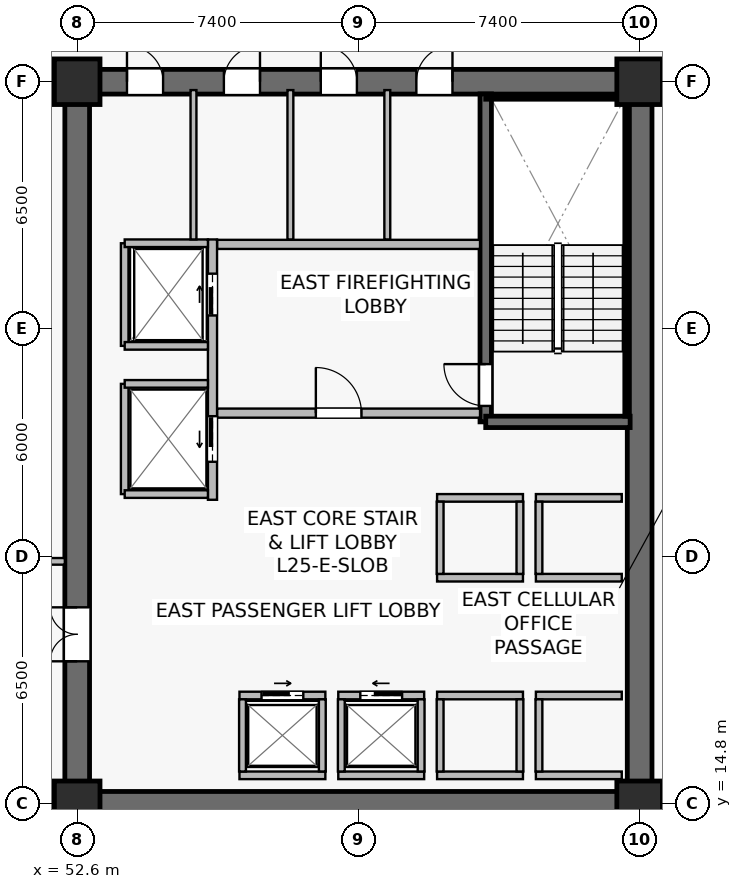
"""IFC4 building model, lengths in metres.
Left out: names, types, materials, properties, quantities, classifications, styles, units other than length and angle.
Written with IfcOpenShell. Run it as: python <this file> out.ifc"""

import sys

from ifc_helpers import new_model, si_unit, direction, frame, frame_2d, origin, origin_2d, place, context, subcontext, project, spatial, rectangle, extrude, source, transform, mapped, element, fill, save


model = new_model("IFC4")
c1 = context("Model", 3, precision=1e-05, world=origin(), true_north=direction((0.0, 1.0)))
c2 = subcontext(c1, "Body", "Model", "MODEL_VIEW")
j1 = project(units=[si_unit("LENGTHUNIT", "METRE"), si_unit("PLANEANGLEUNIT", "RADIAN")], contexts=[c1])
p1 = place(None, origin())
s1 = spatial("IfcSite", under=j1, at=p1, CompositionType="ELEMENT")
p2 = place(p1, origin())
s2 = spatial("IfcBuilding", under=s1, at=p2, CompositionType="ELEMENT")
p3 = place(p2, frame((0.0, 0.0, 105.1)))
s3 = spatial("IfcBuildingStorey", under=s2, at=p3, CompositionType="ELEMENT", Elevation=105.1)
p4 = place(p3, frame((52.275, 14.8, 0.0), z_axis=(0.0, 0.0, 1.0), x_axis=(1.0, 0.0, 0.0)))
e1 = element("IfcWall", 1, at=p4, inside=s3, PredefinedType="SHEAR", context=c2, shape_type="SweptSolid", body=[
    extrude(rectangle(XDim=15.45, YDim=0.65, at=frame_2d((7.725, 0.0))), origin(), (0.0, 0.0, 1.0), 3.79),
])
p5 = place(p3, frame((52.275, 33.8, 0.0), z_axis=(0.0, 0.0, 1.0), x_axis=(1.0, 0.0, 0.0)))
e2 = element("IfcWall", 2, at=p5, inside=s3, PredefinedType="SHEAR", context=c2, shape_type="SweptSolid", body=[
    extrude(rectangle(XDim=15.45, YDim=0.65, at=frame_2d((7.725, 0.0))), origin(), (0.0, 0.0, 1.0), 3.79),
])
p6 = place(p5, frame((9.25, 0.0, 0.0)))
e3 = element("IfcOpeningElement", 3, at=p6, cuts=e2, PredefinedType="OPENING", context=c2, shape_type="SweptSolid", body=[
    extrude(rectangle(XDim=0.95, YDim=2.15, at=frame_2d((0.475, 1.075))), frame((0.0, 0.335, 0.0), z_axis=(0.0, -1.0, 0.0), x_axis=(1.0, 0.0, 0.0)), (0.0, 0.0, 1.0), 0.67),
])
p7 = place(p5, frame((6.735, 0.0, 0.0)))
e4 = element("IfcOpeningElement", 4, at=p7, cuts=e2, PredefinedType="OPENING", context=c2, shape_type="SweptSolid", body=[
    extrude(rectangle(XDim=0.95, YDim=2.15, at=frame_2d((0.475, 1.075))), frame((0.0, 0.335, 0.0), z_axis=(0.0, -1.0, 0.0), x_axis=(1.0, 0.0, 0.0)), (0.0, 0.0, 1.0), 0.67),
])
p8 = place(p5, frame((4.185, 0.0, 0.0)))
e5 = element("IfcOpeningElement", 5, at=p8, cuts=e2, PredefinedType="OPENING", context=c2, shape_type="SweptSolid", body=[
    extrude(rectangle(XDim=0.95, YDim=2.15, at=frame_2d((0.475, 1.075))), frame((0.0, 0.335, 0.0), z_axis=(0.0, -1.0, 0.0), x_axis=(1.0, 0.0, 0.0)), (0.0, 0.0, 1.0), 0.67),
])
p9 = place(p5, frame((1.635, 0.0, 0.0)))
e6 = element("IfcOpeningElement", 6, at=p9, cuts=e2, PredefinedType="OPENING", context=c2, shape_type="SweptSolid", body=[
    extrude(rectangle(XDim=0.95, YDim=2.15, at=frame_2d((0.475, 1.075))), frame((0.0, 0.335, 0.0), z_axis=(0.0, -1.0, 0.0), x_axis=(1.0, 0.0, 0.0)), (0.0, 0.0, 1.0), 0.67),
])
p10 = place(p3, frame((52.6, 15.125, 0.0), z_axis=(0.0, 0.0, 1.0), x_axis=(0.0, 1.0, 0.0)))
e7 = element("IfcWall", 7, at=p10, inside=s3, PredefinedType="SHEAR", context=c2, shape_type="SweptSolid", body=[
    extrude(rectangle(XDim=18.35, YDim=0.65, at=frame_2d((9.175, 0.0))), origin(), (0.0, 0.0, 1.0), 3.79),
])
p11 = place(p10, frame((3.425, 0.0, 0.0)))
e8 = element("IfcOpeningElement", 8, at=p11, cuts=e7, PredefinedType="OPENING", context=c2, shape_type="SweptSolid", body=[
    extrude(rectangle(XDim=1.42, YDim=2.2, at=frame_2d((0.71, 1.1))), frame((0.0, 0.335, 0.0), z_axis=(0.0, -1.0, 0.0), x_axis=(1.0, 0.0, 0.0)), (0.0, 0.0, 1.0), 0.67),
])
p12 = place(p3, frame((67.4, 15.125, 0.0), z_axis=(0.0, 0.0, 1.0), x_axis=(0.0, 1.0, 0.0)))
e9 = element("IfcWall", 9, at=p12, inside=s3, PredefinedType="SHEAR", context=c2, shape_type="SweptSolid", body=[
    extrude(rectangle(XDim=18.35, YDim=0.65, at=frame_2d((9.175, 0.0))), origin(), (0.0, 0.0, 1.0), 3.79),
])
p13 = place(p3, frame((63.35, 24.85, 0.0), z_axis=(0.0, 0.0, 1.0), x_axis=(0.0, 1.0, 0.0)))
e10 = element("IfcWall", 10, at=p13, inside=s3, PredefinedType="SHEAR", context=c2, shape_type="SweptSolid", body=[
    extrude(rectangle(XDim=8.63, YDim=0.3, at=frame_2d((4.315, 0.0))), origin(), (0.0, 0.0, 1.0), 3.79),
])
p14 = place(p13, frame((0.42, 0.0, 0.0)))
e11 = element("IfcOpeningElement", 11, at=p14, cuts=e10, PredefinedType="OPENING", context=c2, shape_type="SweptSolid", body=[
    extrude(rectangle(XDim=1.1, YDim=2.15, at=frame_2d((0.55, 1.075))), frame((0.0, 0.16, 0.0), z_axis=(0.0, -1.0, 0.0), x_axis=(1.0, 0.0, 0.0)), (0.0, 0.0, 1.0), 0.32),
])
p15 = place(p3, frame((63.35, 24.85, 0.0), z_axis=(0.0, 0.0, 1.0), x_axis=(1.0, 0.0, 0.0)))
e12 = element("IfcWall", 12, at=p15, inside=s3, PredefinedType="SHEAR", context=c2, shape_type="SweptSolid", body=[
    extrude(rectangle(XDim=3.8, YDim=0.3, at=frame_2d((1.9, 0.0))), origin(), (0.0, 0.0, 1.0), 3.79),
])
p16 = place(p3, frame((63.35, 33.4, 0.0), z_axis=(0.0, 0.0, 1.0), x_axis=(1.0, 0.0, 0.0)))
e13 = element("IfcWall", 13, at=p16, inside=s3, PredefinedType="SOLIDWALL", context=c2, shape_type="SweptSolid", body=[
    extrude(rectangle(XDim=3.72, YDim=0.12, at=frame_2d((1.86, 0.0))), origin(), (0.0, 0.0, 1.0), 3.79),
])
p17 = place(p3, frame((67.07, 25.0, 0.0), z_axis=(0.0, 0.0, 1.0), x_axis=(0.0, 1.0, 0.0)))
e14 = element("IfcWall", 14, at=p17, inside=s3, PredefinedType="SOLIDWALL", context=c2, shape_type="SweptSolid", body=[
    extrude(rectangle(XDim=8.32, YDim=0.12, at=frame_2d((4.16, 0.0))), origin(), (0.0, 0.0, 1.0), 3.79),
])
m1 = source(origin(), c2, "Body", "SweptSolid", [
    extrude(rectangle(XDim=1.2, YDim=1.2, at=origin_2d()), origin(), (0.0, 0.0, 1.0), 4.1),
])
for number, where, z_axis, x_axis in (
    (15, (52.6, 14.8, 0.0), (0.0, 0.0, 1.0), (1.0, 0.0, 0.0)),
    (16, (67.4, 14.8, 0.0), (0.0, 0.0, 1.0), (1.0, 0.0, 0.0)),
    (17, (52.6, 33.8, 0.0), (0.0, 0.0, 1.0), (1.0, 0.0, 0.0)),
    (18, (67.4, 33.8, 0.0), (0.0, 0.0, 1.0), (1.0, 0.0, 0.0)),
):
    element("IfcColumn", number, at=place(p3, frame(where, z_axis=z_axis, x_axis=x_axis)), inside=s3, PredefinedType="COLUMN", context=c2, shape_type="MappedRepresentation", body=[
        mapped(m1, transform((0.0, 0.0, 0.0), scale=1.0)),
    ])
p18 = place(p3, frame((56.28, 25.08, 0.0), z_axis=(0.0, 0.0, 1.0), x_axis=(1.0, 0.0, 0.0)))
e19 = element("IfcWall", 19, at=p18, inside=s3, PredefinedType="SOLIDWALL", context=c2, shape_type="SweptSolid", body=[
    extrude(rectangle(XDim=6.92, YDim=0.24, at=frame_2d((3.46, 0.0))), origin(), (0.0, 0.0, 1.0), 3.125),
])
p19 = place(p18, frame((2.6, 0.0, 0.0)))
e20 = element("IfcOpeningElement", 20, at=p19, cuts=e19, PredefinedType="OPENING", context=c2, shape_type="SweptSolid", body=[
    extrude(rectangle(XDim=1.2, YDim=2.16, at=frame_2d((0.6, 1.08))), frame((0.0, 0.13, 0.0), z_axis=(0.0, -1.0, 0.0), x_axis=(1.0, 0.0, 0.0)), (0.0, 0.0, 1.0), 0.26),
])
p20 = place(p3, frame((56.28, 29.52, 0.0), z_axis=(0.0, 0.0, 1.0), x_axis=(1.0, 0.0, 0.0)))
e21 = element("IfcWall", 21, at=p20, inside=s3, PredefinedType="SOLIDWALL", context=c2, shape_type="SweptSolid", body=[
    extrude(rectangle(XDim=6.92, YDim=0.24, at=frame_2d((3.46, 0.0))), origin(), (0.0, 0.0, 1.0), 3.125),
])
p21 = place(p3, frame((56.16, 22.8, 0.0), z_axis=(0.0, 0.0, 1.0), x_axis=(0.0, 1.0, 0.0)))
e22 = element("IfcWall", 22, at=p21, inside=s3, PredefinedType="SOLIDWALL", context=c2, shape_type="SweptSolid", body=[
    extrude(rectangle(XDim=6.85, YDim=0.24, at=frame_2d((3.425, 0.0))), origin(), (0.0, 0.0, 1.0), 2.875),
])
p22 = place(p21, frame((4.85, 0.0, 0.0)))
e23 = element("IfcOpeningElement", 23, at=p22, cuts=e22, PredefinedType="OPENING", context=c2, shape_type="SweptSolid", body=[
    extrude(rectangle(XDim=1.1, YDim=2.22, at=frame_2d((0.55, 1.11))), frame((0.0, 0.13, 0.0), z_axis=(0.0, -1.0, 0.0), x_axis=(1.0, 0.0, 0.0)), (0.0, 0.0, 1.0), 0.26),
])
p23 = place(p21, frame((1.0, 0.0, 0.0)))
e24 = element("IfcOpeningElement", 24, at=p23, cuts=e22, PredefinedType="OPENING", context=c2, shape_type="SweptSolid", body=[
    extrude(rectangle(XDim=1.2, YDim=2.22, at=frame_2d((0.6, 1.11))), frame((0.0, 0.13, 0.0), z_axis=(0.0, -1.0, 0.0), x_axis=(1.0, 0.0, 0.0)), (0.0, 0.0, 1.0), 0.26),
])
for number, where, z_axis, x_axis in (
    (25, (64.67, 17.65, 0.0), (0.0, 0.0, 1.0), (1.0, 0.0, 0.0)),
    (26, (64.67, 15.55, 0.0), (0.0, 0.0, 1.0), (1.0, 0.0, 0.0)),
):
    element("IfcWall", number, at=place(p3, frame(where, z_axis=z_axis, x_axis=x_axis)), inside=s3, PredefinedType="SOLIDWALL", context=c2, shape_type="SweptSolid", body=[
        extrude(rectangle(XDim=2.26, YDim=0.2, at=frame_2d((1.13, 0.0))), origin(), (0.0, 0.0, 1.0), 3.79),
    ])
p24 = place(p3, frame((64.75, 15.65, 0.0), z_axis=(0.0, 0.0, 1.0), x_axis=(0.0, 1.0, 0.0)))
e27 = element("IfcWall", 27, at=p24, inside=s3, PredefinedType="SOLIDWALL", context=c2, shape_type="SweptSolid", body=[
    extrude(rectangle(XDim=1.9, YDim=0.18, at=frame_2d((0.95, 0.0))), origin(), (0.0, 0.0, 1.0), 3.79),
])
for number, where, z_axis, x_axis in (
    (28, (62.07, 17.65, 0.0), (0.0, 0.0, 1.0), (1.0, 0.0, 0.0)),
    (29, (62.07, 15.55, 0.0), (0.0, 0.0, 1.0), (1.0, 0.0, 0.0)),
):
    element("IfcWall", number, at=place(p3, frame(where, z_axis=z_axis, x_axis=x_axis)), inside=s3, PredefinedType="SOLIDWALL", context=c2, shape_type="SweptSolid", body=[
        extrude(rectangle(XDim=2.26, YDim=0.2, at=frame_2d((1.13, 0.0))), origin(), (0.0, 0.0, 1.0), 3.79),
    ])
for number, where, z_axis, x_axis in (
    (30, (62.15, 15.65, 0.0), (0.0, 0.0, 1.0), (0.0, 1.0, 0.0)),
    (31, (64.25, 15.65, 0.0), (0.0, 0.0, 1.0), (0.0, 1.0, 0.0)),
):
    element("IfcWall", number, at=place(p3, frame(where, z_axis=z_axis, x_axis=x_axis)), inside=s3, PredefinedType="SOLIDWALL", context=c2, shape_type="SweptSolid", body=[
        extrude(rectangle(XDim=1.9, YDim=0.18, at=frame_2d((0.95, 0.0))), origin(), (0.0, 0.0, 1.0), 3.79),
    ])
p25 = place(p3, frame((59.47, 17.65, 0.0), z_axis=(0.0, 0.0, 1.0), x_axis=(1.0, 0.0, 0.0)))
e32 = element("IfcWall", 32, at=p25, inside=s3, PredefinedType="SOLIDWALL", context=c2, shape_type="SweptSolid", body=[
    extrude(rectangle(XDim=2.26, YDim=0.2, at=frame_2d((1.13, 0.0))), origin(), (0.0, 0.0, 1.0), 3.125),
])
p26 = place(p25, frame((0.58, 0.0, 0.0)))
e33 = element("IfcOpeningElement", 33, at=p26, cuts=e32, PredefinedType="OPENING", context=c2, shape_type="SweptSolid", body=[
    extrude(rectangle(XDim=1.1, YDim=2.22, at=frame_2d((0.55, 1.11))), frame((0.0, 0.11, 0.0), z_axis=(0.0, -1.0, 0.0), x_axis=(1.0, 0.0, 0.0)), (0.0, 0.0, 1.0), 0.22),
])
p27 = place(p3, frame((59.47, 15.55, 0.0), z_axis=(0.0, 0.0, 1.0), x_axis=(1.0, 0.0, 0.0)))
e34 = element("IfcWall", 34, at=p27, inside=s3, PredefinedType="SOLIDWALL", context=c2, shape_type="SweptSolid", body=[
    extrude(rectangle(XDim=2.26, YDim=0.2, at=frame_2d((1.13, 0.0))), origin(), (0.0, 0.0, 1.0), 3.125),
])
for number, where, z_axis, x_axis in (
    (35, (59.55, 15.65, 0.0), (0.0, 0.0, 1.0), (0.0, 1.0, 0.0)),
    (36, (61.65, 15.65, 0.0), (0.0, 0.0, 1.0), (0.0, 1.0, 0.0)),
):
    element("IfcWall", number, at=place(p3, frame(where, z_axis=z_axis, x_axis=x_axis)), inside=s3, PredefinedType="SOLIDWALL", context=c2, shape_type="SweptSolid", body=[
        extrude(rectangle(XDim=1.9, YDim=0.18, at=frame_2d((0.95, 0.0))), origin(), (0.0, 0.0, 1.0), 3.79),
    ])
p28 = place(p3, frame((56.87, 17.65, 0.0), z_axis=(0.0, 0.0, 1.0), x_axis=(1.0, 0.0, 0.0)))
e37 = element("IfcWall", 37, at=p28, inside=s3, PredefinedType="SOLIDWALL", context=c2, shape_type="SweptSolid", body=[
    extrude(rectangle(XDim=2.26, YDim=0.2, at=frame_2d((1.13, 0.0))), origin(), (0.0, 0.0, 1.0), 3.79),
])
p29 = place(p28, frame((0.58, 0.0, 0.0)))
e38 = element("IfcOpeningElement", 38, at=p29, cuts=e37, PredefinedType="OPENING", context=c2, shape_type="SweptSolid", body=[
    extrude(rectangle(XDim=1.1, YDim=2.22, at=frame_2d((0.55, 1.11))), frame((0.0, 0.11, 0.0), z_axis=(0.0, -1.0, 0.0), x_axis=(1.0, 0.0, 0.0)), (0.0, 0.0, 1.0), 0.22),
])
p30 = place(p3, frame((56.87, 15.55, 0.0), z_axis=(0.0, 0.0, 1.0), x_axis=(1.0, 0.0, 0.0)))
e39 = element("IfcWall", 39, at=p30, inside=s3, PredefinedType="SOLIDWALL", context=c2, shape_type="SweptSolid", body=[
    extrude(rectangle(XDim=2.26, YDim=0.2, at=frame_2d((1.13, 0.0))), origin(), (0.0, 0.0, 1.0), 3.79),
])
for number, where, z_axis, x_axis in (
    (40, (56.95, 15.65, 0.0), (0.0, 0.0, 1.0), (0.0, 1.0, 0.0)),
    (41, (59.05, 15.65, 0.0), (0.0, 0.0, 1.0), (0.0, 1.0, 0.0)),
):
    element("IfcWall", number, at=place(p3, frame(where, z_axis=z_axis, x_axis=x_axis)), inside=s3, PredefinedType="SOLIDWALL", context=c2, shape_type="SweptSolid", body=[
        extrude(rectangle(XDim=1.9, YDim=0.18, at=frame_2d((0.95, 0.0))), origin(), (0.0, 0.0, 1.0), 3.79),
    ])
for number, where, z_axis, x_axis in (
    (42, (64.67, 20.75, 0.0), (0.0, 0.0, 1.0), (1.0, 0.0, 0.0)),
    (43, (64.67, 22.85, 0.0), (0.0, 0.0, 1.0), (1.0, 0.0, 0.0)),
):
    element("IfcWall", number, at=place(p3, frame(where, z_axis=z_axis, x_axis=x_axis)), inside=s3, PredefinedType="SOLIDWALL", context=c2, shape_type="SweptSolid", body=[
        extrude(rectangle(XDim=2.26, YDim=0.2, at=frame_2d((1.13, 0.0))), origin(), (0.0, 0.0, 1.0), 3.79),
    ])
p31 = place(p3, frame((64.75, 20.85, 0.0), z_axis=(0.0, 0.0, 1.0), x_axis=(0.0, 1.0, 0.0)))
e44 = element("IfcWall", 44, at=p31, inside=s3, PredefinedType="SOLIDWALL", context=c2, shape_type="SweptSolid", body=[
    extrude(rectangle(XDim=1.9, YDim=0.18, at=frame_2d((0.95, 0.0))), origin(), (0.0, 0.0, 1.0), 3.79),
])
for number, where, z_axis, x_axis in (
    (45, (62.07, 20.75, 0.0), (0.0, 0.0, 1.0), (1.0, 0.0, 0.0)),
    (46, (62.07, 22.85, 0.0), (0.0, 0.0, 1.0), (1.0, 0.0, 0.0)),
):
    element("IfcWall", number, at=place(p3, frame(where, z_axis=z_axis, x_axis=x_axis)), inside=s3, PredefinedType="SOLIDWALL", context=c2, shape_type="SweptSolid", body=[
        extrude(rectangle(XDim=2.26, YDim=0.2, at=frame_2d((1.13, 0.0))), origin(), (0.0, 0.0, 1.0), 3.79),
    ])
for number, where, z_axis, x_axis in (
    (47, (62.15, 20.85, 0.0), (0.0, 0.0, 1.0), (0.0, 1.0, 0.0)),
    (48, (64.25, 20.85, 0.0), (0.0, 0.0, 1.0), (0.0, 1.0, 0.0)),
):
    element("IfcWall", number, at=place(p3, frame(where, z_axis=z_axis, x_axis=x_axis)), inside=s3, PredefinedType="SOLIDWALL", context=c2, shape_type="SweptSolid", body=[
        extrude(rectangle(XDim=1.9, YDim=0.18, at=frame_2d((0.95, 0.0))), origin(), (0.0, 0.0, 1.0), 3.79),
    ])
p32 = place(p3, frame((53.85, 26.85, 0.0), z_axis=(0.0, 0.0, 1.0), x_axis=(0.0, 1.0, 0.0)))
e49 = element("IfcWall", 49, at=p32, inside=s3, PredefinedType="SOLIDWALL", context=c2, shape_type="SweptSolid", body=[
    extrude(rectangle(XDim=2.7, YDim=0.2, at=frame_2d((1.35, 0.0))), origin(), (0.0, 0.0, 1.0), 3.79),
])
p33 = place(p3, frame((53.85, 29.55, 0.0), z_axis=(0.0, 0.0, 1.0), x_axis=(1.0, 0.0, 0.0)))
e50 = element("IfcWall", 50, at=p33, inside=s3, PredefinedType="SOLIDWALL", context=c2, shape_type="SweptSolid", body=[
    extrude(rectangle(XDim=2.19, YDim=0.2, at=frame_2d((1.095, 0.0))), origin(), (0.0, 0.0, 1.0), 3.79),
])
p34 = place(p3, frame((53.85, 26.85, 0.0), z_axis=(0.0, 0.0, 1.0), x_axis=(1.0, 0.0, 0.0)))
e51 = element("IfcWall", 51, at=p34, inside=s3, PredefinedType="SOLIDWALL", context=c2, shape_type="SweptSolid", body=[
    extrude(rectangle(XDim=2.19, YDim=0.2, at=frame_2d((1.095, 0.0))), origin(), (0.0, 0.0, 1.0), 3.187),
])
p35 = place(p3, frame((53.85, 22.95, 0.0), z_axis=(0.0, 0.0, 1.0), x_axis=(0.0, 1.0, 0.0)))
e52 = element("IfcWall", 52, at=p35, inside=s3, PredefinedType="SOLIDWALL", context=c2, shape_type="SweptSolid", body=[
    extrude(rectangle(XDim=2.9, YDim=0.2, at=frame_2d((1.45, 0.0))), origin(), (0.0, 0.0, 1.0), 2.875),
])
for number, where, z_axis, x_axis in (
    (53, (53.85, 25.85, 0.0), (0.0, 0.0, 1.0), (1.0, 0.0, 0.0)),
    (54, (53.85, 22.95, 0.0), (0.0, 0.0, 1.0), (1.0, 0.0, 0.0)),
):
    element("IfcWall", number, at=place(p3, frame(where, z_axis=z_axis, x_axis=x_axis)), inside=s3, PredefinedType="SOLIDWALL", context=c2, shape_type="SweptSolid", body=[
        extrude(rectangle(XDim=2.19, YDim=0.2, at=frame_2d((1.095, 0.0))), origin(), (0.0, 0.0, 1.0), 3.79),
    ])
for number, where, z_axis, x_axis in (
    (55, (60.76, 29.65, 0.0), (0.0, 0.0, 1.0), (0.0, 1.0, 0.0)),
    (56, (58.21, 29.65, 0.0), (0.0, 0.0, 1.0), (0.0, 1.0, 0.0)),
    (57, (55.66, 29.65, 0.0), (0.0, 0.0, 1.0), (0.0, 1.0, 0.0)),
):
    element("IfcWall", number, at=place(p3, frame(where, z_axis=z_axis, x_axis=x_axis)), inside=s3, PredefinedType="PLUMBINGWALL", context=c2, shape_type="SweptSolid", body=[
        extrude(rectangle(XDim=3.93, YDim=0.155, at=frame_2d((1.965, 0.0))), origin(), (0.0, 0.0, 1.0), 3.79),
    ])
p36 = place(p3, frame((48.3, 34.26, 0.0), z_axis=(0.0, 0.0, 1.0), x_axis=(1.0, 0.0, 0.0)))
e58 = element("IfcWall", 58, at=p36, inside=s3, PredefinedType="PARTITIONING", context=c2, shape_type="SweptSolid", body=[
    extrude(rectangle(XDim=3.975, YDim=0.175, at=frame_2d((1.987, 0.0))), origin(), (0.0, 0.0, 1.0), 3.475),
])
p37 = place(p3, frame((48.3, 21.18, 0.0), z_axis=(0.0, 0.0, 1.0), x_axis=(1.0, 0.0, 0.0)))
e59 = element("IfcWall", 59, at=p37, inside=s3, PredefinedType="PARTITIONING", context=c2, shape_type="SweptSolid", body=[
    extrude(rectangle(XDim=3.975, YDim=0.175, at=frame_2d((1.987, 0.0))), origin(), (0.0, 0.0, 1.0), 3.79),
])
p38 = place(p37, frame((1.35, 0.0, 0.0)))
e60 = element("IfcOpeningElement", 60, at=p38, cuts=e59, PredefinedType="OPENING", context=c2, shape_type="SweptSolid", body=[
    extrude(rectangle(XDim=0.95, YDim=2.15, at=frame_2d((0.475, 1.075))), frame((0.0, 0.098, 0.0), z_axis=(0.0, -1.0, 0.0), x_axis=(1.0, 0.0, 0.0)), (0.0, 0.0, 1.0), 0.195),
])
m2 = source(origin(), c2, "Body", "SweptSolid", [
    extrude(rectangle(XDim=1.1, YDim=2.15, at=frame_2d((0.55, 1.075))), frame((0.0, 0.025, 0.0), z_axis=(0.0, -1.0, 0.0), x_axis=(1.0, 0.0, 0.0)), (0.0, 0.0, 1.0), 0.05),
])
p39 = place(p14, origin())
e61 = element("IfcDoor", 61, at=p39, inside=s3, OperationType="SINGLE_SWING_RIGHT", PredefinedType="DOOR", context=c2, shape_type="MappedRepresentation", body=[
    mapped(m2, transform((0.0, 0.0, 0.0), scale=1.0)),
])
fill(e11, e61)
m3 = source(origin(), c2, "Body", "SweptSolid", [
    extrude(rectangle(XDim=1.2, YDim=2.16, at=frame_2d((0.6, 1.08))), frame((0.0, 0.025, 0.0), z_axis=(0.0, -1.0, 0.0), x_axis=(1.0, 0.0, 0.0)), (0.0, 0.0, 1.0), 0.05),
])
p40 = place(p19, origin())
e62 = element("IfcDoor", 62, at=p40, inside=s3, OperationType="SINGLE_SWING_LEFT", PredefinedType="DOOR", context=c2, shape_type="MappedRepresentation", body=[
    mapped(m3, transform((0.0, 0.0, 0.0), scale=1.0)),
])
fill(e20, e62)
m4 = source(origin(), c2, "Body", "SweptSolid", [
    extrude(rectangle(XDim=1.1, YDim=2.22, at=frame_2d((0.55, 1.11))), frame((0.0, 0.025, 0.0), z_axis=(0.0, -1.0, 0.0), x_axis=(1.0, 0.0, 0.0)), (0.0, 0.0, 1.0), 0.05),
])
p41 = place(p26, origin())
e63 = element("IfcDoor", 63, at=p41, inside=s3, OperationType="SLIDING_TO_LEFT", PredefinedType="USERDEFINED", context=c2, shape_type="MappedRepresentation", body=[
    mapped(m4, transform((0.0, 0.0, 0.0), scale=1.0)),
])
fill(e33, e63)
p42 = place(p29, origin())
e64 = element("IfcDoor", 64, at=p42, inside=s3, OperationType="SLIDING_TO_RIGHT", PredefinedType="USERDEFINED", context=c2, shape_type="MappedRepresentation", body=[
    mapped(m4, transform((0.0, 0.0, 0.0), scale=1.0)),
])
fill(e38, e64)
p43 = place(p22, origin())
e65 = element("IfcDoor", 65, at=p43, inside=s3, OperationType="SLIDING_TO_RIGHT", PredefinedType="USERDEFINED", context=c2, shape_type="MappedRepresentation", body=[
    mapped(m4, transform((0.0, 0.0, 0.0), scale=1.0)),
])
fill(e23, e65)
m5 = source(origin(), c2, "Body", "SweptSolid", [
    extrude(rectangle(XDim=1.2, YDim=2.22, at=frame_2d((0.6, 1.11))), frame((0.0, 0.025, 0.0), z_axis=(0.0, -1.0, 0.0), x_axis=(1.0, 0.0, 0.0)), (0.0, 0.0, 1.0), 0.05),
])
p44 = place(p23, origin())
e66 = element("IfcDoor", 66, at=p44, inside=s3, OperationType="SLIDING_TO_LEFT", PredefinedType="USERDEFINED", context=c2, shape_type="MappedRepresentation", body=[
    mapped(m5, transform((0.0, 0.0, 0.0), scale=1.0)),
])
fill(e24, e66)
m6 = source(origin(), c2, "Body", "SweptSolid", [
    extrude(rectangle(XDim=1.42, YDim=2.2, at=frame_2d((0.71, 1.1))), frame((0.0, 0.025, 0.0), z_axis=(0.0, -1.0, 0.0), x_axis=(1.0, 0.0, 0.0)), (0.0, 0.0, 1.0), 0.05),
])
p45 = place(p11, origin())
e67 = element("IfcDoor", 67, at=p45, inside=s3, OperationType="DOUBLE_DOOR_SINGLE_SWING", PredefinedType="DOOR", context=c2, shape_type="MappedRepresentation", body=[
    mapped(m6, transform((0.0, 0.0, 0.0), scale=1.0)),
])
fill(e8, e67)
m7 = source(origin(), c2, "Body", "SweptSolid", [
    extrude(rectangle(XDim=0.95, YDim=2.15, at=frame_2d((0.475, 1.075))), frame((0.0, 0.025, 0.0), z_axis=(0.0, -1.0, 0.0), x_axis=(1.0, 0.0, 0.0)), (0.0, 0.0, 1.0), 0.05),
])
p46 = place(p6, origin())
e68 = element("IfcDoor", 68, at=p46, inside=s3, OperationType="SINGLE_SWING_RIGHT", PredefinedType="DOOR", context=c2, shape_type="MappedRepresentation", body=[
    mapped(m7, transform((0.0, 0.0, 0.0), scale=1.0)),
])
fill(e3, e68)
p47 = place(p7, origin())
e69 = element("IfcDoor", 69, at=p47, inside=s3, OperationType="SINGLE_SWING_LEFT", PredefinedType="DOOR", context=c2, shape_type="MappedRepresentation", body=[
    mapped(m7, transform((0.0, 0.0, 0.0), scale=1.0)),
])
fill(e4, e69)
p48 = place(p8, origin())
e70 = element("IfcDoor", 70, at=p48, inside=s3, OperationType="SINGLE_SWING_RIGHT", PredefinedType="DOOR", context=c2, shape_type="MappedRepresentation", body=[
    mapped(m7, transform((0.0, 0.0, 0.0), scale=1.0)),
])
fill(e5, e70)
p49 = place(p9, origin())
e71 = element("IfcDoor", 71, at=p49, inside=s3, OperationType="SINGLE_SWING_LEFT", PredefinedType="DOOR", context=c2, shape_type="MappedRepresentation", body=[
    mapped(m7, transform((0.0, 0.0, 0.0), scale=1.0)),
])
fill(e6, e71)
save(model, sys.argv[1])
